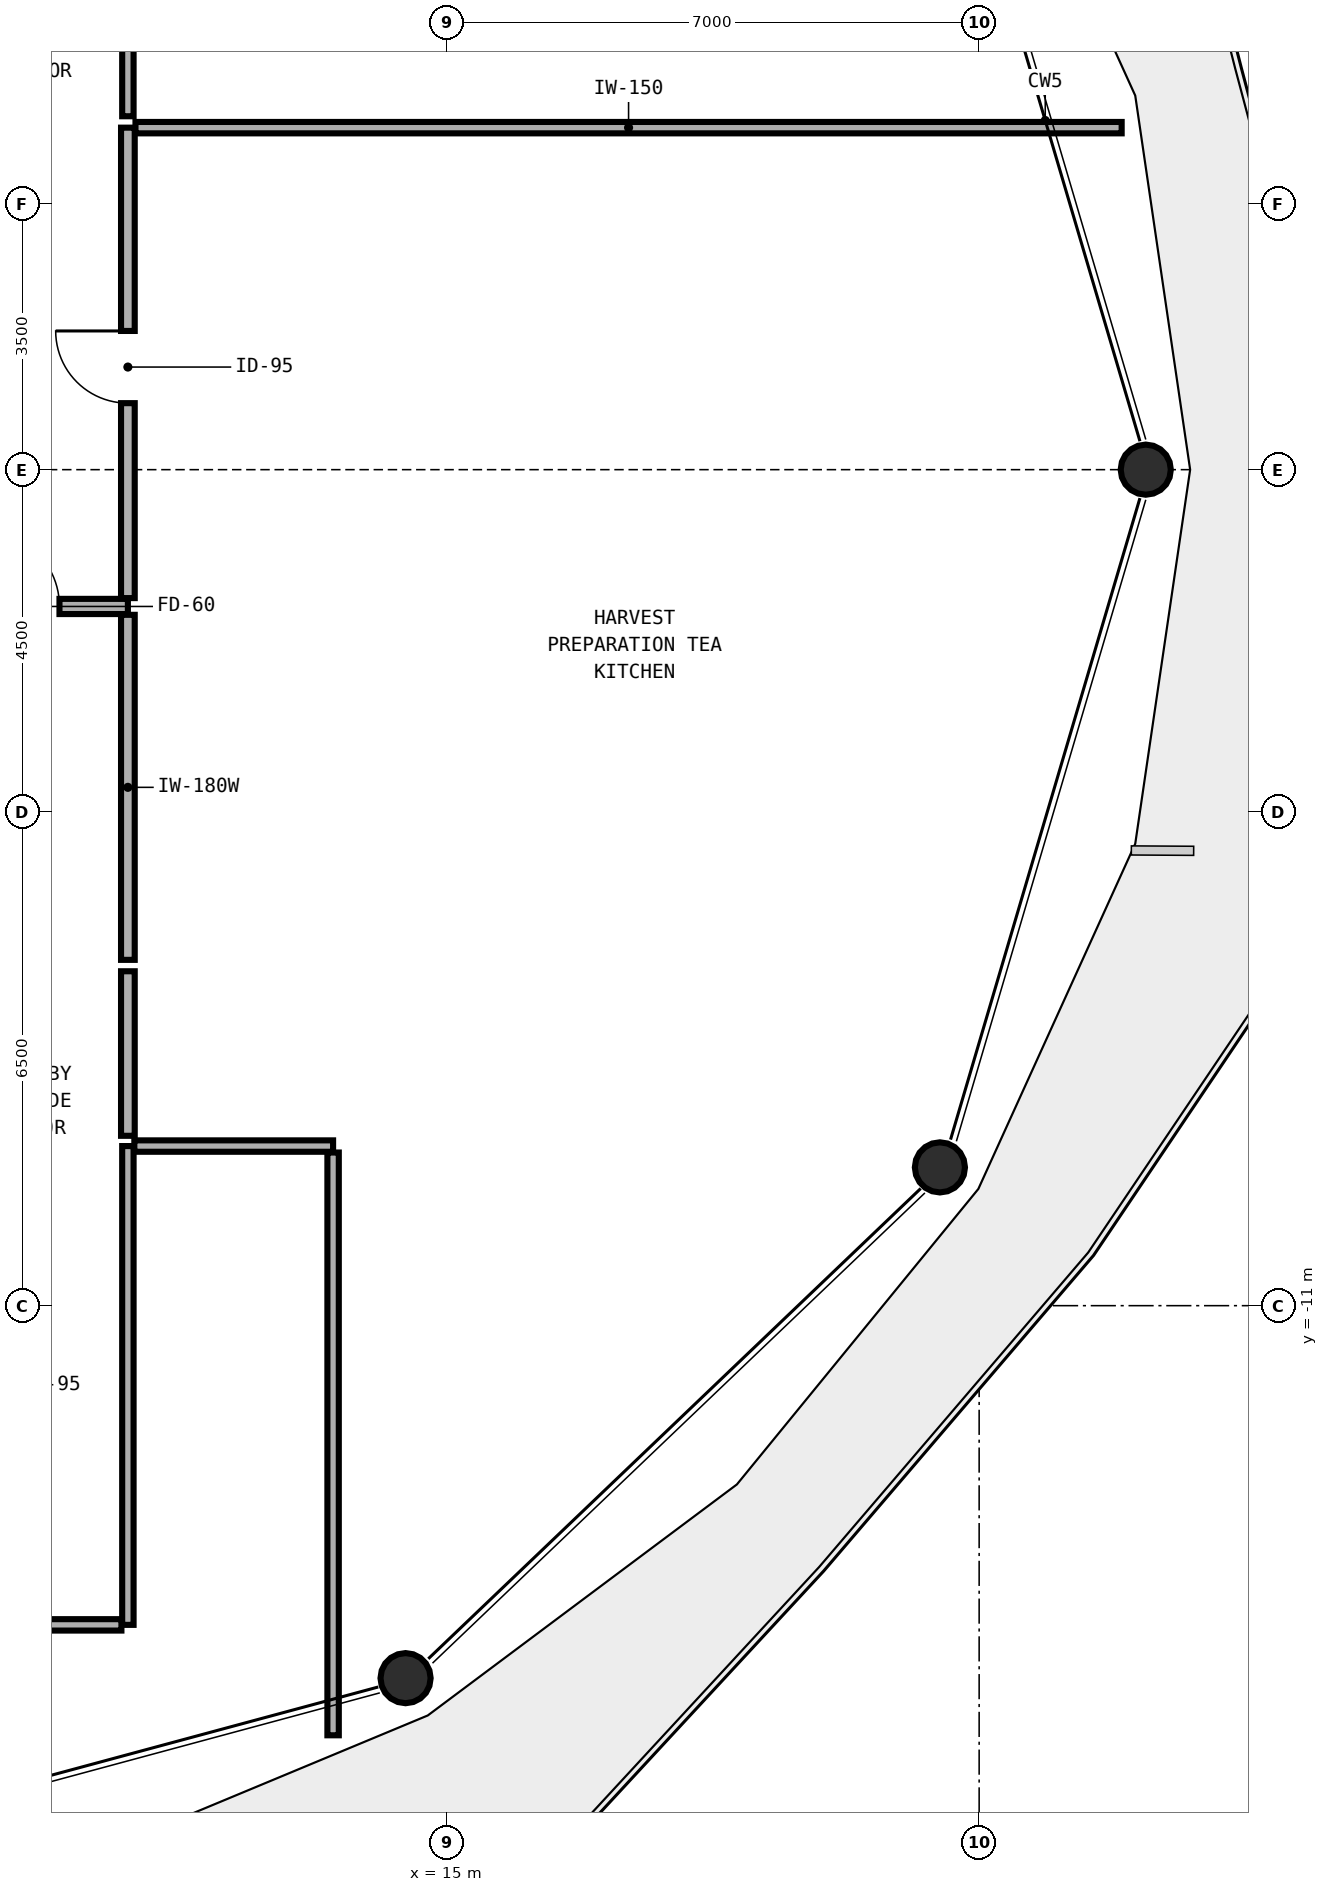
"""IFC4 building model, lengths in metres.
Left out: names, types, materials, properties, quantities, classifications, styles, units other than length and angle.
Written with IfcOpenShell. Run it as: python <this file> out.ifc"""

import sys

from ifc_helpers import new_model, si_unit, direction, frame, frame_2d, origin, origin_2d, place, context, subcontext, project, spatial, rectangle, hollow_circle, extrude, element, fill, save


model = new_model("IFC4")
c1 = context("Model", 3, precision=1e-05, world=origin(), true_north=direction((0.0, 1.0)))
c2 = subcontext(c1, "Body", "Model", "MODEL_VIEW")
j1 = project(units=[si_unit("LENGTHUNIT", "METRE"), si_unit("PLANEANGLEUNIT", "RADIAN")], contexts=[c1])
p1 = place(None, origin())
s1 = spatial("IfcSite", under=j1, at=p1, CompositionType="ELEMENT")
p2 = place(p1, origin())
s2 = spatial("IfcBuilding", under=s1, at=p2, CompositionType="ELEMENT")
p3 = place(p2, frame((0.0, 0.0, 200.4)))
s3 = spatial("IfcBuildingStorey", under=s2, at=p3, CompositionType="ELEMENT", Elevation=200.4)
p4 = place(p3, frame((24.226, 0.0, 0.0), z_axis=(-0.01904871465, 0.0, 0.999818556774), x_axis=(0.0, -1.0, 0.0)))
e1 = element("IfcColumn", 1, at=p4, inside=s3, PredefinedType="COLUMN", context=c2, shape_type="SweptSolid", body=[
    extrude(hollow_circle(Radius=0.33, WallThickness=0.025, at=origin_2d()), origin(), (0.0, 0.0, 1.0), 3.576),
])
p5 = place(p3, frame((14.47, -15.916, 0.0), z_axis=(-0.009491195893, 0.008193838181, 0.999921386018), x_axis=(-0.653478078623, -0.756945441072, 0.0)))
e2 = element("IfcColumn", 2, at=p5, inside=s3, PredefinedType="COLUMN", context=c2, shape_type="SweptSolid", body=[
    extrude(hollow_circle(Radius=0.33, WallThickness=0.025, at=origin_2d()), origin(), (0.0, 0.0, 1.0), 3.575),
])
p6 = place(p3, frame((21.513, -9.189, 0.0), z_axis=(-0.01645484131, 0.004711137139, 0.999853510963), x_axis=(-0.275247949014, -0.961373271193, 0.0)))
e3 = element("IfcColumn", 3, at=p6, inside=s3, PredefinedType="COLUMN", context=c2, shape_type="SweptSolid", body=[
    extrude(hollow_circle(Radius=0.33, WallThickness=0.025, at=origin_2d()), origin(), (0.0, 0.0, 1.0), 3.576),
])
p7 = place(p3, frame((8.16, -1.8, 0.0), z_axis=(0.0, 0.0, 1.0), x_axis=(1.0, 0.0, 0.0)))
e4 = element("IfcWall", 4, at=p7, inside=s3, PredefinedType="MOVABLE", context=c2, shape_type="SweptSolid", body=[
    extrude(rectangle(XDim=2.64, YDim=0.2, at=frame_2d((1.32, 0.0))), origin(), (0.0, 0.0, 1.0), 3.36),
])
p8 = place(p7, frame((0.74, 0.0, 0.0)))
e5 = element("IfcOpeningElement", 5, at=p8, cuts=e4, PredefinedType="OPENING", context=c2, shape_type="SweptSolid", body=[
    extrude(rectangle(XDim=1.0, YDim=2.1, at=frame_2d((0.5, 1.05))), frame((0.0, 0.11, 0.0), z_axis=(0.0, -1.0, 0.0), x_axis=(1.0, 0.0, 0.0)), (0.0, 0.0, 1.0), 0.22),
])
p9 = place(p3, frame((10.8, -1.69, 0.0), z_axis=(0.0, 0.0, 1.0), x_axis=(0.0, 1.0, 0.0)))
e6 = element("IfcWall", 6, at=p9, inside=s3, PredefinedType="PLUMBINGWALL", context=c2, shape_type="SweptSolid", body=[
    extrude(rectangle(XDim=6.19, YDim=0.18, at=frame_2d((3.095, 0.0))), origin(), (0.0, 0.0, 1.0), 3.36),
])
p10 = place(p9, frame((2.565, 0.0, 0.0)))
e7 = element("IfcOpeningElement", 7, at=p10, cuts=e6, PredefinedType="OPENING", context=c2, shape_type="SweptSolid", body=[
    extrude(rectangle(XDim=0.95, YDim=2.1, at=frame_2d((0.475, 1.05))), frame((0.0, 0.1, 0.0), z_axis=(0.0, -1.0, 0.0), x_axis=(1.0, 0.0, 0.0)), (0.0, 0.0, 1.0), 0.2),
])
p11 = place(p3, frame((10.8, 4.65, 0.0), z_axis=(0.0, 0.0, 1.0), x_axis=(0.0, 1.0, 0.0)))
e8 = element("IfcWall", 8, at=p11, inside=s3, PredefinedType="PARTITIONING", context=c2, shape_type="SweptSolid", body=[
    extrude(rectangle(XDim=7.85, YDim=0.15, at=frame_2d((3.925, 0.0))), origin(), (0.0, 0.0, 1.0), 3.36),
])
p12 = place(p11, frame((3.375, 0.0, 0.0)))
e9 = element("IfcOpeningElement", 9, at=p12, cuts=e8, PredefinedType="OPENING", context=c2, shape_type="SweptSolid", body=[
    extrude(rectangle(XDim=0.95, YDim=2.1, at=frame_2d((0.475, 1.05))), frame((0.0, 0.085, 0.0), z_axis=(0.0, -1.0, 0.0), x_axis=(1.0, 0.0, 0.0)), (0.0, 0.0, 1.0), 0.17),
])
p13 = place(p3, frame((10.8, -15.2, 0.0), z_axis=(0.0, 0.0, 1.0), x_axis=(0.0, 1.0, 0.0)))
e10 = element("IfcWall", 10, at=p13, inside=s3, PredefinedType="PARTITIONING", context=c2, shape_type="SweptSolid", body=[
    extrude(rectangle(XDim=6.3, YDim=0.15, at=frame_2d((3.15, 0.0))), origin(), (0.0, 0.0, 1.0), 3.36),
])
p14 = place(p3, frame((8.085, -15.2, 0.0), z_axis=(0.0, 0.0, 1.0), x_axis=(1.0, 0.0, 0.0)))
e11 = element("IfcWall", 11, at=p14, inside=s3, PredefinedType="PARTITIONING", context=c2, shape_type="SweptSolid", body=[
    extrude(rectangle(XDim=2.63, YDim=0.15, at=frame_2d((1.315, 0.0))), origin(), (0.0, 0.0, 1.0), 3.36),
])
p15 = place(p3, frame((10.885, -8.9, 0.0), z_axis=(0.0, 0.0, 1.0), x_axis=(1.0, 0.0, 0.0)))
e12 = element("IfcWall", 12, at=p15, inside=s3, PredefinedType="PARTITIONING", context=c2, shape_type="SweptSolid", body=[
    extrude(rectangle(XDim=2.615, YDim=0.15, at=frame_2d((1.308, 0.0))), origin(), (0.0, 0.0, 1.0), 3.36),
])
p16 = place(p3, frame((13.5, -8.985, 0.0), z_axis=(0.0, 0.0, 1.0), x_axis=(0.0, -1.0, 0.0)))
e13 = element("IfcWall", 13, at=p16, inside=s3, PredefinedType="PARTITIONING", context=c2, shape_type="SweptSolid", body=[
    extrude(rectangle(XDim=7.668, YDim=0.15, at=frame_2d((3.834, 0.0))), origin(), (0.0, 0.0, 1.0), 3.36),
])
p17 = place(p3, frame((10.8, -8.765, 0.0), z_axis=(0.0, 0.0, 1.0), x_axis=(0.0, 1.0, 0.0)))
e14 = element("IfcWall", 14, at=p17, inside=s3, PredefinedType="PLUMBINGWALL", context=c2, shape_type="SweptSolid", body=[
    extrude(rectangle(XDim=2.165, YDim=0.18, at=frame_2d((1.083, 0.0))), origin(), (0.0, 0.0, 1.0), 3.36),
])
p18 = place(p3, frame((10.8, -6.45, 0.0), z_axis=(0.0, 0.0, 1.0), x_axis=(0.0, 1.0, 0.0)))
e15 = element("IfcWall", 15, at=p18, inside=s3, PredefinedType="PLUMBINGWALL", context=c2, shape_type="SweptSolid", body=[
    extrude(rectangle(XDim=4.54, YDim=0.18, at=frame_2d((2.27, 0.0))), origin(), (0.0, 0.0, 1.0), 3.36),
])
p19 = place(p3, frame((10.9, 4.5, 0.0), z_axis=(0.0, 0.0, 1.0), x_axis=(1.0, 0.0, 0.0)))
e16 = element("IfcWall", 16, at=p19, inside=s3, PredefinedType="PARTITIONING", context=c2, shape_type="SweptSolid", body=[
    extrude(rectangle(XDim=12.975, YDim=0.15, at=frame_2d((6.488, 0.0))), origin(), (0.0, 0.0, 1.0), 3.36),
])
p20 = place(p8, origin())
e17 = element("IfcDoor", 17, at=p20, inside=s3, OperationType="SINGLE_SWING_LEFT", PredefinedType="DOOR", context=c2, shape_type="SweptSolid", body=[
    extrude(rectangle(XDim=1.0, YDim=2.1, at=frame_2d((0.5, 1.05))), frame((0.0, 0.025, 0.0), z_axis=(0.0, -1.0, 0.0), x_axis=(1.0, 0.0, 0.0)), (0.0, 0.0, 1.0), 0.05),
])
fill(e5, e17)
p21 = place(p10, origin())
e18 = element("IfcDoor", 18, at=p21, inside=s3, OperationType="SINGLE_SWING_RIGHT", PredefinedType="DOOR", context=c2, shape_type="SweptSolid", body=[
    extrude(rectangle(XDim=0.95, YDim=2.1, at=frame_2d((0.475, 1.05))), frame((0.0, 0.025, 0.0), z_axis=(0.0, -1.0, 0.0), x_axis=(1.0, 0.0, 0.0)), (0.0, 0.0, 1.0), 0.05),
])
fill(e7, e18)
save(model, sys.argv[1])
